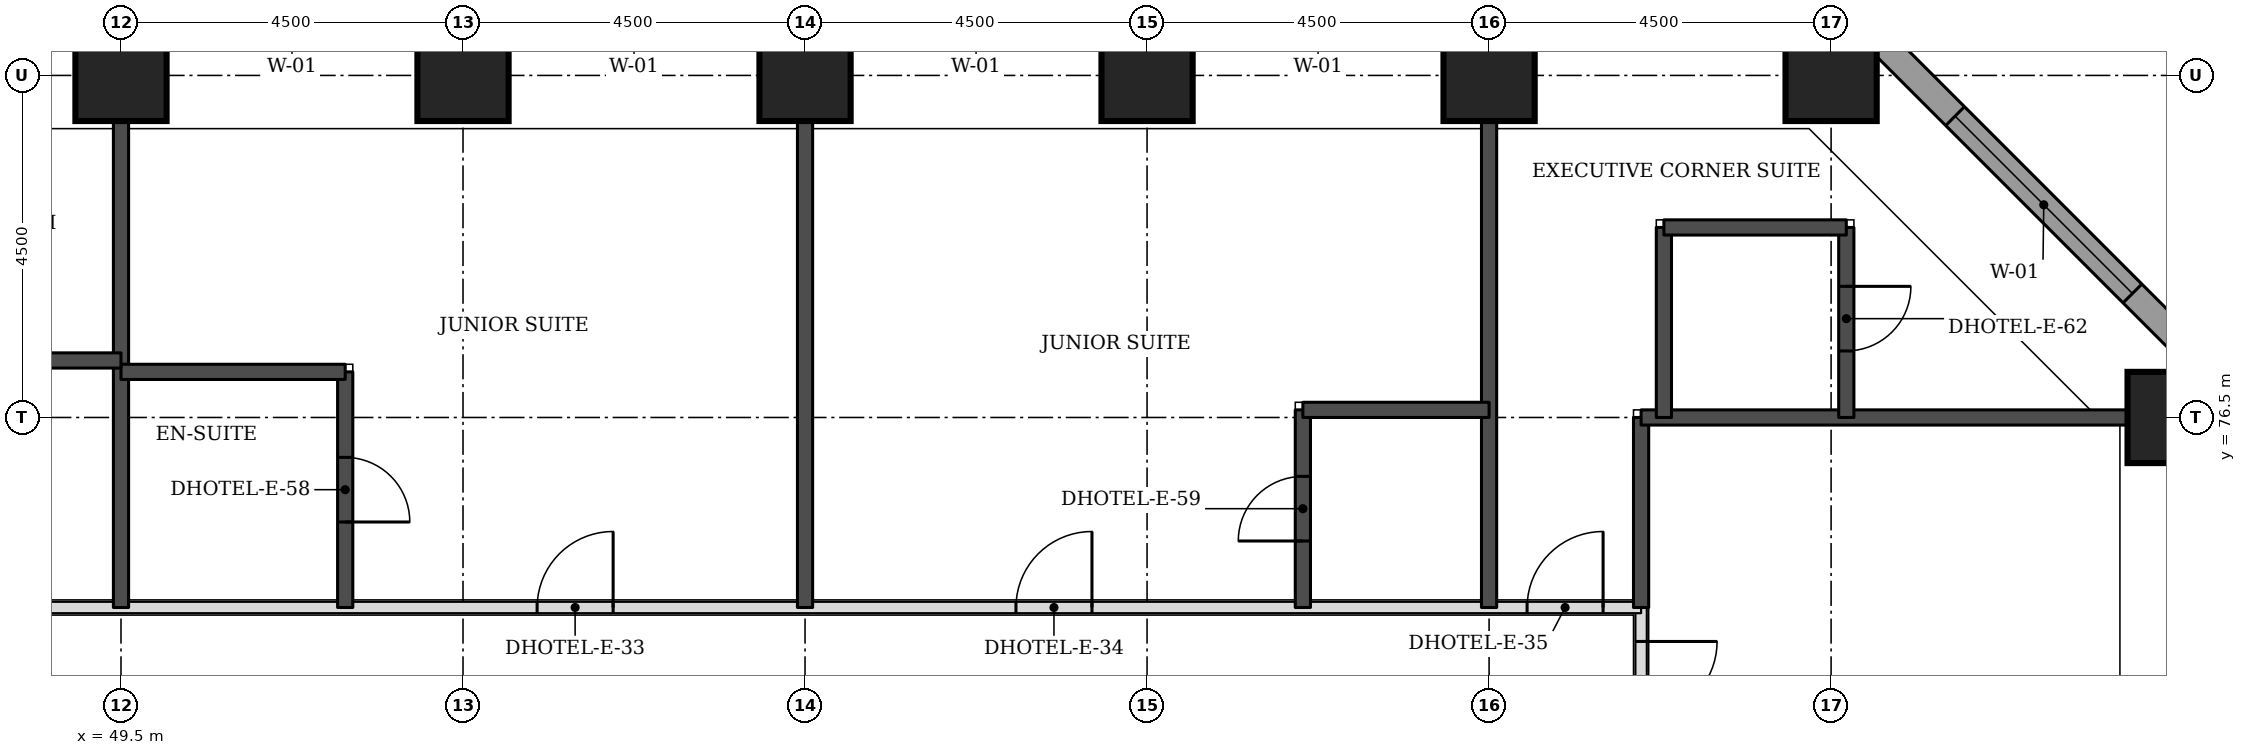
"""IFC4 building model, lengths in metres.
Left out: names, types, materials, properties, quantities, classifications, styles, units other than length and angle.
Written with IfcOpenShell. Run it as: python <this file> out.ifc"""

import sys

from ifc_helpers import new_model, si_unit, direction, frame, frame_2d, origin, origin_2d, place, context, subcontext, project, spatial, rectangle, extrude, element, fill, save


model = new_model("IFC4")
c1 = context("Model", 3, precision=1e-05, world=origin(), true_north=direction((0.0, 1.0)))
c2 = subcontext(c1, "Body", "Model", "MODEL_VIEW")
j1 = project(units=[si_unit("LENGTHUNIT", "METRE"), si_unit("PLANEANGLEUNIT", "RADIAN")], contexts=[c1])
p1 = place(None, origin())
s1 = spatial("IfcSite", under=j1, at=p1, CompositionType="ELEMENT")
p2 = place(p1, origin())
s2 = spatial("IfcBuilding", under=s1, at=p2, CompositionType="ELEMENT")
p3 = place(p2, frame((0.0, 0.0, 39.6)))
s3 = spatial("IfcBuildingStorey", under=s2, at=p3, CompositionType="ELEMENT", Elevation=39.6)
for number, where, z_axis, x_axis in (
    (1, (76.5, 76.5, 0.0), (0.0, 0.0, 1.0), (1.0, 0.0, 0.0)),
    (2, (49.5, 81.0, 0.0), (0.0, 0.0, 1.0), (1.0, 0.0, 0.0)),
    (3, (54.0, 81.0, 0.0), (0.0, 0.0, 1.0), (1.0, 0.0, 0.0)),
    (4, (58.5, 81.0, 0.0), (0.0, 0.0, 1.0), (1.0, 0.0, 0.0)),
    (5, (63.0, 81.0, 0.0), (0.0, 0.0, 1.0), (1.0, 0.0, 0.0)),
    (6, (67.5, 81.0, 0.0), (0.0, 0.0, 1.0), (1.0, 0.0, 0.0)),
    (7, (72.0, 81.0, 0.0), (0.0, 0.0, 1.0), (1.0, 0.0, 0.0)),
):
    element("IfcColumn", number, at=place(p3, frame(where, z_axis=z_axis, x_axis=x_axis)), inside=s3, PredefinedType="COLUMN", context=c2, shape_type="SweptSolid", body=[
        extrude(rectangle(XDim=1.2, YDim=1.2, at=origin_2d()), origin(), (0.0, 0.0, 1.0), 3.3),
    ])
p4 = place(p3, frame((77.326, 76.77, 0.0), z_axis=(0.0, 0.0, 1.0), x_axis=(-0.707106781187, 0.707106781187, 0.0)))
e8 = element("IfcWall", 8, at=p4, inside=s3, PredefinedType="STANDARD", context=c2, shape_type="SweptSolid", body=[
    extrude(rectangle(XDim=7.151, YDim=0.35, at=frame_2d((3.576, 0.0))), origin(), (0.0, 0.0, 1.0), 3.055),
])
p5 = place(p4, frame((1.926, 0.0, 0.8)))
e9 = element("IfcOpeningElement", 9, at=p5, cuts=e8, PredefinedType="OPENING", context=c2, shape_type="SweptSolid", body=[
    extrude(rectangle(XDim=3.3, YDim=1.5, at=frame_2d((1.65, 0.75))), frame((0.0, 0.185, 0.0), z_axis=(0.0, -1.0, 0.0), x_axis=(1.0, 0.0, 0.0)), (0.0, 0.0, 1.0), 0.37),
])
p6 = place(p3, frame((69.5, 47.5, 0.0), z_axis=(0.0, 0.0, 1.0), x_axis=(0.0, 1.0, 0.0)))
e10 = element("IfcWall", 10, at=p6, inside=s3, PredefinedType="PARTITIONING", context=c2, shape_type="SweptSolid", body=[
    extrude(rectangle(XDim=26.5, YDim=0.15, at=frame_2d((13.25, 0.0))), origin(), (0.0, 0.0, 1.0), 3.08),
])
p7 = place(p6, frame((25.053, 0.0, 0.0)))
e11 = element("IfcOpeningElement", 11, at=p7, cuts=e10, PredefinedType="OPENING", context=c2, shape_type="SweptSolid", body=[
    extrude(rectangle(XDim=1.0, YDim=2.1, at=frame_2d((0.5, 1.05))), frame((0.0, 0.085, 0.0), z_axis=(0.0, -1.0, 0.0), x_axis=(1.0, 0.0, 0.0)), (0.0, 0.0, 1.0), 0.17),
])
p8 = place(p6, frame((13.775, 0.0, 0.0)))
e12 = element("IfcOpeningElement", 12, at=p8, cuts=e10, PredefinedType="OPENING", context=c2, shape_type="SweptSolid", body=[
    extrude(rectangle(XDim=1.0, YDim=2.1, at=frame_2d((0.5, 1.05))), frame((0.0, 0.085, 0.0), z_axis=(0.0, -1.0, 0.0), x_axis=(1.0, 0.0, 0.0)), (0.0, 0.0, 1.0), 0.17),
])
p9 = place(p6, frame((7.65, 0.0, 0.0)))
e13 = element("IfcOpeningElement", 13, at=p9, cuts=e10, PredefinedType="OPENING", context=c2, shape_type="SweptSolid", body=[
    extrude(rectangle(XDim=1.1, YDim=2.1, at=frame_2d((0.55, 1.05))), frame((0.0, 0.085, 0.0), z_axis=(0.0, -1.0, 0.0), x_axis=(1.0, 0.0, 0.0)), (0.0, 0.0, 1.0), 0.17),
])
p10 = place(p6, frame((0.447, 0.0, 0.0)))
e14 = element("IfcOpeningElement", 14, at=p10, cuts=e10, PredefinedType="OPENING", context=c2, shape_type="SweptSolid", body=[
    extrude(rectangle(XDim=1.0, YDim=2.1, at=frame_2d((0.5, 1.05))), frame((0.0, 0.085, 0.0), z_axis=(0.0, -1.0, 0.0), x_axis=(1.0, 0.0, 0.0)), (0.0, 0.0, 1.0), 0.17),
])
p11 = place(p3, frame((43.0, 74.0, 0.0), z_axis=(0.0, 0.0, 1.0), x_axis=(1.0, 0.0, 0.0)))
e15 = element("IfcWall", 15, at=p11, inside=s3, PredefinedType="PARTITIONING", context=c2, shape_type="SweptSolid", body=[
    extrude(rectangle(XDim=26.5, YDim=0.15, at=frame_2d((13.25, 0.0))), origin(), (0.0, 0.0, 1.0), 3.08),
])
p12 = place(p11, frame((2.825, 0.0, 0.0)))
e16 = element("IfcOpeningElement", 16, at=p12, cuts=e15, PredefinedType="OPENING", context=c2, shape_type="SweptSolid", body=[
    extrude(rectangle(XDim=1.0, YDim=2.1, at=frame_2d((0.5, 1.05))), frame((0.0, 0.085, 0.0), z_axis=(0.0, -1.0, 0.0), x_axis=(1.0, 0.0, 0.0)), (0.0, 0.0, 1.0), 0.17),
])
p13 = place(p11, frame((11.975, 0.0, 0.0)))
e17 = element("IfcOpeningElement", 17, at=p13, cuts=e15, PredefinedType="OPENING", context=c2, shape_type="SweptSolid", body=[
    extrude(rectangle(XDim=1.0, YDim=2.1, at=frame_2d((0.5, 1.05))), frame((0.0, 0.085, 0.0), z_axis=(0.0, -1.0, 0.0), x_axis=(1.0, 0.0, 0.0)), (0.0, 0.0, 1.0), 0.17),
])
p14 = place(p11, frame((18.275, 0.0, 0.0)))
e18 = element("IfcOpeningElement", 18, at=p14, cuts=e15, PredefinedType="OPENING", context=c2, shape_type="SweptSolid", body=[
    extrude(rectangle(XDim=1.0, YDim=2.1, at=frame_2d((0.5, 1.05))), frame((0.0, 0.085, 0.0), z_axis=(0.0, -1.0, 0.0), x_axis=(1.0, 0.0, 0.0)), (0.0, 0.0, 1.0), 0.17),
])
p15 = place(p11, frame((0.5, 0.0, 0.0)))
e19 = element("IfcOpeningElement", 19, at=p15, cuts=e15, PredefinedType="OPENING", context=c2, shape_type="SweptSolid", body=[
    extrude(rectangle(XDim=1.0, YDim=2.1, at=frame_2d((0.5, 1.05))), frame((0.0, 0.085, 0.0), z_axis=(0.0, -1.0, 0.0), x_axis=(1.0, 0.0, 0.0)), (0.0, 0.0, 1.0), 0.17),
])
p16 = place(p11, frame((25.0, 0.0, 0.0)))
e20 = element("IfcOpeningElement", 20, at=p16, cuts=e15, PredefinedType="OPENING", context=c2, shape_type="SweptSolid", body=[
    extrude(rectangle(XDim=1.0, YDim=2.1, at=frame_2d((0.5, 1.05))), frame((0.0, 0.085, 0.0), z_axis=(0.0, -1.0, 0.0), x_axis=(1.0, 0.0, 0.0)), (0.0, 0.0, 1.0), 0.17),
])
p17 = place(p3, frame((49.5, 74.0, 0.0), z_axis=(0.0, 0.0, 1.0), x_axis=(0.0, 1.0, 0.0)))
e21 = element("IfcWall", 21, at=p17, inside=s3, PredefinedType="SOLIDWALL", context=c2, shape_type="SweptSolid", body=[
    extrude(rectangle(XDim=6.4, YDim=0.2, at=frame_2d((3.2, 0.0))), origin(), (0.0, 0.0, 1.0), 3.08),
])
p18 = place(p3, frame((52.45, 74.0, 0.0), z_axis=(0.0, 0.0, 1.0), x_axis=(0.0, 1.0, 0.0)))
e22 = element("IfcWall", 22, at=p18, inside=s3, PredefinedType="SOLIDWALL", context=c2, shape_type="SweptSolid", body=[
    extrude(rectangle(XDim=3.1, YDim=0.2, at=frame_2d((1.55, 0.0))), origin(), (0.0, 0.0, 1.0), 3.08),
])
p19 = place(p18, frame((1.125, 0.0, 0.0)))
e23 = element("IfcOpeningElement", 23, at=p19, cuts=e22, PredefinedType="OPENING", context=c2, shape_type="SweptSolid", body=[
    extrude(rectangle(XDim=0.85, YDim=2.1, at=frame_2d((0.425, 1.05))), frame((0.0, 0.11, 0.0), z_axis=(0.0, -1.0, 0.0), x_axis=(1.0, 0.0, 0.0)), (0.0, 0.0, 1.0), 0.22),
])
p20 = place(p3, frame((58.5, 74.0, 0.0), z_axis=(0.0, 0.0, 1.0), x_axis=(0.0, 1.0, 0.0)))
e24 = element("IfcWall", 24, at=p20, inside=s3, PredefinedType="SOLIDWALL", context=c2, shape_type="SweptSolid", body=[
    extrude(rectangle(XDim=6.4, YDim=0.2, at=frame_2d((3.2, 0.0))), origin(), (0.0, 0.0, 1.0), 3.08),
])
p21 = place(p3, frame((65.05, 74.0, 0.0), z_axis=(0.0, 0.0, 1.0), x_axis=(0.0, 1.0, 0.0)))
e25 = element("IfcWall", 25, at=p21, inside=s3, PredefinedType="SOLIDWALL", context=c2, shape_type="SweptSolid", body=[
    extrude(rectangle(XDim=2.6, YDim=0.2, at=frame_2d((1.3, 0.0))), origin(), (0.0, 0.0, 1.0), 3.08),
])
p22 = place(p21, frame((0.875, 0.0, 0.0)))
e26 = element("IfcOpeningElement", 26, at=p22, cuts=e25, PredefinedType="OPENING", context=c2, shape_type="SweptSolid", body=[
    extrude(rectangle(XDim=0.85, YDim=2.1, at=frame_2d((0.425, 1.05))), frame((0.0, 0.11, 0.0), z_axis=(0.0, -1.0, 0.0), x_axis=(1.0, 0.0, 0.0)), (0.0, 0.0, 1.0), 0.22),
])
p23 = place(p3, frame((67.5, 74.0, 0.0), z_axis=(0.0, 0.0, 1.0), x_axis=(0.0, 1.0, 0.0)))
e27 = element("IfcWall", 27, at=p23, inside=s3, PredefinedType="SOLIDWALL", context=c2, shape_type="SweptSolid", body=[
    extrude(rectangle(XDim=6.4, YDim=0.2, at=frame_2d((3.2, 0.0))), origin(), (0.0, 0.0, 1.0), 3.08),
])
p24 = place(p3, frame((69.5, 74.0, 0.0), z_axis=(0.0, 0.0, 1.0), x_axis=(0.0, 1.0, 0.0)))
e28 = element("IfcWall", 28, at=p24, inside=s3, PredefinedType="SOLIDWALL", context=c2, shape_type="SweptSolid", body=[
    extrude(rectangle(XDim=2.5, YDim=0.2, at=frame_2d((1.25, 0.0))), origin(), (0.0, 0.0, 1.0), 3.08),
])
p25 = place(p3, frame((69.5, 76.5, 0.0), z_axis=(0.0, 0.0, 1.0), x_axis=(1.0, 0.0, 0.0)))
e29 = element("IfcWall", 29, at=p25, inside=s3, PredefinedType="SOLIDWALL", context=c2, shape_type="SweptSolid", body=[
    extrude(rectangle(XDim=6.4, YDim=0.2, at=frame_2d((3.2, 0.0))), origin(), (0.0, 0.0, 1.0), 3.08),
])
p26 = place(p3, frame((69.8, 76.5, 0.0), z_axis=(0.0, 0.0, 1.0), x_axis=(0.0, 1.0, 0.0)))
e30 = element("IfcWall", 30, at=p26, inside=s3, PredefinedType="SOLIDWALL", context=c2, shape_type="SweptSolid", body=[
    extrude(rectangle(XDim=2.5, YDim=0.2, at=frame_2d((1.25, 0.0))), origin(), (0.0, 0.0, 1.0), 3.08),
])
p27 = place(p3, frame((72.2, 76.5, 0.0), z_axis=(0.0, 0.0, 1.0), x_axis=(0.0, 1.0, 0.0)))
e31 = element("IfcWall", 31, at=p27, inside=s3, PredefinedType="SOLIDWALL", context=c2, shape_type="SweptSolid", body=[
    extrude(rectangle(XDim=2.5, YDim=0.2, at=frame_2d((1.25, 0.0))), origin(), (0.0, 0.0, 1.0), 3.08),
])
p28 = place(p27, frame((0.875, 0.0, 0.0)))
e32 = element("IfcOpeningElement", 32, at=p28, cuts=e31, PredefinedType="OPENING", context=c2, shape_type="SweptSolid", body=[
    extrude(rectangle(XDim=0.85, YDim=2.1, at=frame_2d((0.425, 1.05))), frame((0.0, 0.11, 0.0), z_axis=(0.0, -1.0, 0.0), x_axis=(1.0, 0.0, 0.0)), (0.0, 0.0, 1.0), 0.22),
])
p29 = place(p3, frame((65.05, 76.6, 0.0), z_axis=(0.0, 0.0, 1.0), x_axis=(1.0, 0.0, 0.0)))
e33 = element("IfcWall", 33, at=p29, inside=s3, PredefinedType="SOLIDWALL", context=c2, shape_type="SweptSolid", body=[
    extrude(rectangle(XDim=2.45, YDim=0.2, at=frame_2d((1.225, 0.0))), origin(), (0.0, 0.0, 1.0), 3.08),
])
p30 = place(p3, frame((49.5, 77.1, 0.0), z_axis=(0.0, 0.0, 1.0), x_axis=(1.0, 0.0, 0.0)))
e34 = element("IfcWall", 34, at=p30, inside=s3, PredefinedType="SOLIDWALL", context=c2, shape_type="SweptSolid", body=[
    extrude(rectangle(XDim=2.95, YDim=0.2, at=frame_2d((1.475, 0.0))), origin(), (0.0, 0.0, 1.0), 3.08),
])
p31 = place(p3, frame((47.65, 77.25, 0.0), z_axis=(0.0, 0.0, 1.0), x_axis=(1.0, 0.0, 0.0)))
e35 = element("IfcWall", 35, at=p31, inside=s3, PredefinedType="SOLIDWALL", context=c2, shape_type="SweptSolid", body=[
    extrude(rectangle(XDim=1.85, YDim=0.2, at=frame_2d((0.925, 0.0))), origin(), (0.0, 0.0, 1.0), 3.08),
])
p32 = place(p3, frame((69.8, 79.0, 0.0), z_axis=(0.0, 0.0, 1.0), x_axis=(1.0, 0.0, 0.0)))
e36 = element("IfcWall", 36, at=p32, inside=s3, PredefinedType="SOLIDWALL", context=c2, shape_type="SweptSolid", body=[
    extrude(rectangle(XDim=2.4, YDim=0.2, at=frame_2d((1.2, 0.0))), origin(), (0.0, 0.0, 1.0), 3.08),
])
p33 = place(p5, origin())
e37 = element("IfcWindow", 37, at=p33, inside=s3, PartitioningType="SINGLE_PANEL", PredefinedType="WINDOW", context=c2, shape_type="SweptSolid", body=[
    extrude(rectangle(XDim=3.3, YDim=1.5, at=frame_2d((1.65, 0.75))), frame((0.0, 0.085, 0.0), z_axis=(0.0, -1.0, 0.0), x_axis=(1.0, 0.0, 0.0)), (0.0, 0.0, 1.0), 0.06),
])
fill(e9, e37)
p34 = place(p13, origin())
e38 = element("IfcDoor", 38, at=p34, inside=s3, OperationType="SINGLE_SWING_RIGHT", PredefinedType="DOOR", context=c2, shape_type="SweptSolid", body=[
    extrude(rectangle(XDim=1.0, YDim=2.1, at=frame_2d((0.5, 1.05))), frame((0.0, 0.025, 0.0), z_axis=(0.0, -1.0, 0.0), x_axis=(1.0, 0.0, 0.0)), (0.0, 0.0, 1.0), 0.05),
])
fill(e17, e38)
p35 = place(p19, frame((0.85, 0.0, 0.0), z_axis=(0.0, 0.0, 1.0), x_axis=(-1.0, 0.0, 0.0)))
e39 = element("IfcDoor", 39, at=p35, inside=s3, OperationType="SINGLE_SWING_RIGHT", PredefinedType="DOOR", context=c2, shape_type="SweptSolid", body=[
    extrude(rectangle(XDim=0.85, YDim=2.1, at=frame_2d((0.425, 1.05))), frame((0.0, 0.025, 0.0), z_axis=(0.0, -1.0, 0.0), x_axis=(1.0, 0.0, 0.0)), (0.0, 0.0, 1.0), 0.05),
])
fill(e23, e39)
p36 = place(p14, origin())
e40 = element("IfcDoor", 40, at=p36, inside=s3, OperationType="SINGLE_SWING_RIGHT", PredefinedType="DOOR", context=c2, shape_type="SweptSolid", body=[
    extrude(rectangle(XDim=1.0, YDim=2.1, at=frame_2d((0.5, 1.05))), frame((0.0, 0.025, 0.0), z_axis=(0.0, -1.0, 0.0), x_axis=(1.0, 0.0, 0.0)), (0.0, 0.0, 1.0), 0.05),
])
fill(e18, e40)
p37 = place(p22, origin())
e41 = element("IfcDoor", 41, at=p37, inside=s3, OperationType="SINGLE_SWING_LEFT", PredefinedType="DOOR", context=c2, shape_type="SweptSolid", body=[
    extrude(rectangle(XDim=0.85, YDim=2.1, at=frame_2d((0.425, 1.05))), frame((0.0, 0.025, 0.0), z_axis=(0.0, -1.0, 0.0), x_axis=(1.0, 0.0, 0.0)), (0.0, 0.0, 1.0), 0.05),
])
fill(e26, e41)
p38 = place(p7, frame((1.0, 0.0, 0.0), z_axis=(0.0, 0.0, 1.0), x_axis=(-1.0, 0.0, 0.0)))
e42 = element("IfcDoor", 42, at=p38, inside=s3, OperationType="SINGLE_SWING_LEFT", PredefinedType="DOOR", context=c2, shape_type="SweptSolid", body=[
    extrude(rectangle(XDim=1.0, YDim=2.1, at=frame_2d((0.5, 1.05))), frame((0.0, 0.025, 0.0), z_axis=(0.0, -1.0, 0.0), x_axis=(1.0, 0.0, 0.0)), (0.0, 0.0, 1.0), 0.05),
])
fill(e11, e42)
p39 = place(p16, origin())
e43 = element("IfcDoor", 43, at=p39, inside=s3, OperationType="SINGLE_SWING_RIGHT", PredefinedType="DOOR", context=c2, shape_type="SweptSolid", body=[
    extrude(rectangle(XDim=1.0, YDim=2.1, at=frame_2d((0.5, 1.05))), frame((0.0, 0.025, 0.0), z_axis=(0.0, -1.0, 0.0), x_axis=(1.0, 0.0, 0.0)), (0.0, 0.0, 1.0), 0.05),
])
fill(e20, e43)
p40 = place(p28, frame((0.85, 0.0, 0.0), z_axis=(0.0, 0.0, 1.0), x_axis=(-1.0, 0.0, 0.0)))
e44 = element("IfcDoor", 44, at=p40, inside=s3, OperationType="SINGLE_SWING_LEFT", PredefinedType="DOOR", context=c2, shape_type="SweptSolid", body=[
    extrude(rectangle(XDim=0.85, YDim=2.1, at=frame_2d((0.425, 1.05))), frame((0.0, 0.025, 0.0), z_axis=(0.0, -1.0, 0.0), x_axis=(1.0, 0.0, 0.0)), (0.0, 0.0, 1.0), 0.05),
])
fill(e32, e44)
save(model, sys.argv[1])
